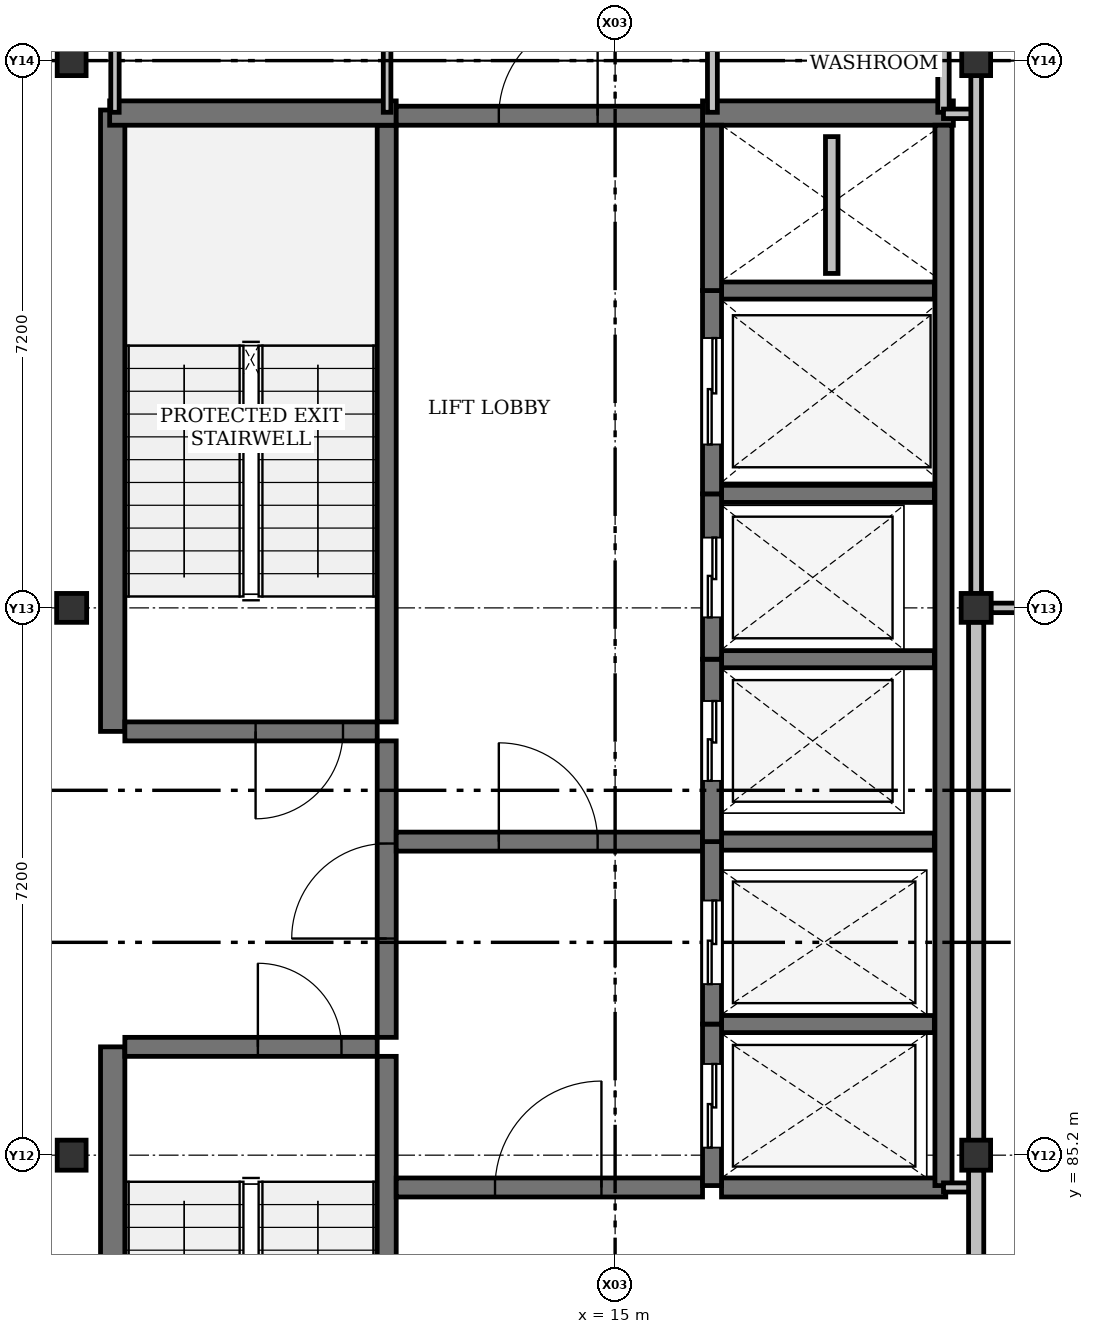
"""IFC4 building model, lengths in metres.
Left out: names, types, materials, properties, quantities, classifications, styles, units other than length and angle.
Written with IfcOpenShell. Run it as: python <this file> out.ifc"""

import sys

from ifc_helpers import new_model, si_unit, direction, frame, frame_2d, origin, origin_2d, place, context, subcontext, project, spatial, rectangle, i_section, extrude, element, fill, save


model = new_model("IFC4")
c1 = context("Model", 3, precision=1e-05, world=origin(), true_north=direction((0.0, 1.0)))
c2 = subcontext(c1, "Body", "Model", "MODEL_VIEW")
j1 = project(units=[si_unit("LENGTHUNIT", "METRE"), si_unit("PLANEANGLEUNIT", "RADIAN")], contexts=[c1])
p1 = place(None, origin())
s1 = spatial("IfcSite", under=j1, at=p1, CompositionType="ELEMENT")
p2 = place(p1, origin())
s2 = spatial("IfcBuilding", under=s1, at=p2, CompositionType="ELEMENT")
p3 = place(p2, frame((0.0, 0.0, 18.3)))
s3 = spatial("IfcBuildingStorey", under=s2, at=p3, CompositionType="ELEMENT", Elevation=18.3)
for number, where, z_axis, x_axis in (
    (1, (7.85, 85.2, 0.0), (0.0, 0.0, 1.0), (0.0, 1.0, 0.0)),
    (2, (19.75, 85.2, 0.0), (0.0, 0.0, 1.0), (0.0, 1.0, 0.0)),
    (3, (7.85, 92.4, 0.0), (0.0, 0.0, 1.0), (1.0, 0.0, 0.0)),
    (4, (19.75, 92.4, 0.0), (0.0, 0.0, 1.0), (1.0, 0.0, 0.0)),
    (5, (7.85, 99.6, 0.0), (0.0, 0.0, 1.0), (0.0, 1.0, 0.0)),
    (6, (19.75, 99.6, 0.0), (0.0, 0.0, 1.0), (0.0, 1.0, 0.0)),
):
    element("IfcColumn", number, at=place(p3, frame(where, z_axis=z_axis, x_axis=x_axis)), inside=s3, PredefinedType="COLUMN", context=c2, shape_type="SweptSolid", body=[
        extrude(i_section(OverallWidth=0.395, OverallDepth=0.38, WebThickness=0.019, FlangeThickness=0.03, FilletRadius=0.015, at=origin_2d()), origin(), (0.0, 0.0, 1.0), 4.2),
    ])
for number, where, z_axis, x_axis in (
    (7, (8.39, 78.45, 0.0), (0.0, 0.0, 1.0), (0.0, 1.0, 0.0)),
    (8, (8.39, 90.775, 0.0), (0.0, 0.0, 1.0), (0.0, 1.0, 0.0)),
):
    element("IfcWall", number, at=place(p3, frame(where, z_axis=z_axis, x_axis=x_axis)), inside=s3, PredefinedType="SHEAR", context=c2, shape_type="SweptSolid", body=[
        extrude(rectangle(XDim=8.175, YDim=0.32, at=frame_2d((4.087, 0.0))), origin(), (0.0, 0.0, 1.0), 4.2),
    ])
for number, where, z_axis, x_axis in (
    (9, (11.995, 78.65, 0.0), (0.0, 0.0, 1.0), (0.0, 1.0, 0.0)),
    (10, (11.995, 90.9, 0.0), (0.0, 0.0, 1.0), (0.0, 1.0, 0.0)),
):
    element("IfcWall", number, at=place(p3, frame(where, z_axis=z_axis, x_axis=x_axis)), inside=s3, PredefinedType="SHEAR", context=c2, shape_type="SweptSolid", body=[
        extrude(rectangle(XDim=7.85, YDim=0.25, at=frame_2d((3.925, 0.0))), origin(), (0.0, 0.0, 1.0), 4.2),
    ])
p4 = place(p3, frame((11.995, 86.75, 0.0), z_axis=(0.0, 0.0, 1.0), x_axis=(0.0, 1.0, 0.0)))
e11 = element("IfcWall", 11, at=p4, inside=s3, PredefinedType="SHEAR", context=c2, shape_type="SweptSolid", body=[
    extrude(rectangle(XDim=3.9, YDim=0.25, at=frame_2d((1.95, 0.0))), origin(), (0.0, 0.0, 1.0), 4.2),
])
p5 = place(p4, frame((1.3, 0.0, 0.0)))
e12 = element("IfcOpeningElement", 12, at=p5, cuts=e11, PredefinedType="OPENING", context=c2, shape_type="SweptSolid", body=[
    extrude(rectangle(XDim=1.25, YDim=2.2, at=frame_2d((0.625, 1.1))), frame((0.0, 0.125, 0.0), z_axis=(0.0, -1.0, 0.0), x_axis=(1.0, 0.0, 0.0)), (0.0, 0.0, 1.0), 0.25),
])
p6 = place(p3, frame((8.35, 98.91, 0.0), z_axis=(0.0, 0.0, 1.0), x_axis=(1.0, 0.0, 0.0)))
e13 = element("IfcWall", 13, at=p6, inside=s3, PredefinedType="SHEAR", context=c2, shape_type="SweptSolid", body=[
    extrude(rectangle(XDim=3.77, YDim=0.32, at=frame_2d((1.885, 0.0))), origin(), (0.0, 0.0, 1.0), 4.2),
])
p7 = place(p3, frame((16.15, 98.91, 0.0), z_axis=(0.0, 0.0, 1.0), x_axis=(1.0, 0.0, 0.0)))
e14 = element("IfcWall", 14, at=p7, inside=s3, PredefinedType="SHEAR", context=c2, shape_type="SweptSolid", body=[
    extrude(rectangle(XDim=3.3, YDim=0.32, at=frame_2d((1.65, 0.0))), origin(), (0.0, 0.0, 1.0), 4.2),
])
p8 = place(p3, frame((12.12, 98.875, 0.0), z_axis=(0.0, 0.0, 1.0), x_axis=(1.0, 0.0, 0.0)))
e15 = element("IfcWall", 15, at=p8, inside=s3, PredefinedType="SHEAR", context=c2, shape_type="SweptSolid", body=[
    extrude(rectangle(XDim=4.03, YDim=0.25, at=frame_2d((2.015, 0.0))), origin(), (0.0, 0.0, 1.0), 4.2),
])
p9 = place(p8, frame((1.35, 0.0, 0.0)))
e16 = element("IfcOpeningElement", 16, at=p9, cuts=e15, PredefinedType="OPENING", context=c2, shape_type="SweptSolid", body=[
    extrude(rectangle(XDim=1.3, YDim=2.2, at=frame_2d((0.65, 1.1))), frame((0.0, 0.125, 0.0), z_axis=(0.0, -1.0, 0.0), x_axis=(1.0, 0.0, 0.0)), (0.0, 0.0, 1.0), 0.25),
])
p10 = place(p3, frame((8.55, 86.625, 0.0), z_axis=(0.0, 0.0, 1.0), x_axis=(1.0, 0.0, 0.0)))
e17 = element("IfcWall", 17, at=p10, inside=s3, PredefinedType="SHEAR", context=c2, shape_type="SweptSolid", body=[
    extrude(rectangle(XDim=3.32, YDim=0.25, at=frame_2d((1.66, 0.0))), origin(), (0.0, 0.0, 1.0), 4.2),
])
p11 = place(p10, frame((1.75, 0.0, 0.0)))
e18 = element("IfcOpeningElement", 18, at=p11, cuts=e17, PredefinedType="OPENING", context=c2, shape_type="SweptSolid", body=[
    extrude(rectangle(XDim=1.1, YDim=2.15, at=frame_2d((0.55, 1.075))), frame((0.0, 0.125, 0.0), z_axis=(0.0, -1.0, 0.0), x_axis=(1.0, 0.0, 0.0)), (0.0, 0.0, 1.0), 0.25),
])
p12 = place(p3, frame((11.87, 90.775, 0.0), z_axis=(0.0, 0.0, 1.0), x_axis=(-1.0, 0.0, 0.0)))
e19 = element("IfcWall", 19, at=p12, inside=s3, PredefinedType="SHEAR", context=c2, shape_type="SweptSolid", body=[
    extrude(rectangle(XDim=3.32, YDim=0.25, at=frame_2d((1.66, 0.0))), origin(), (0.0, 0.0, 1.0), 4.2),
])
p13 = place(p12, frame((0.45, 0.0, 0.0)))
e20 = element("IfcOpeningElement", 20, at=p13, cuts=e19, PredefinedType="OPENING", context=c2, shape_type="SweptSolid", body=[
    extrude(rectangle(XDim=1.15, YDim=2.15, at=frame_2d((0.575, 1.075))), frame((0.0, 0.125, 0.0), z_axis=(0.0, -1.0, 0.0), x_axis=(1.0, 0.0, 0.0)), (0.0, 0.0, 1.0), 0.25),
])
p14 = place(p3, frame((12.12, 89.325, 0.0), z_axis=(0.0, 0.0, 1.0), x_axis=(1.0, 0.0, 0.0)))
e21 = element("IfcWall", 21, at=p14, inside=s3, PredefinedType="SHEAR", context=c2, shape_type="SweptSolid", body=[
    extrude(rectangle(XDim=4.03, YDim=0.25, at=frame_2d((2.015, 0.0))), origin(), (0.0, 0.0, 1.0), 4.2),
])
p15 = place(p14, frame((1.35, 0.0, 0.0)))
e22 = element("IfcOpeningElement", 22, at=p15, cuts=e21, PredefinedType="OPENING", context=c2, shape_type="SweptSolid", body=[
    extrude(rectangle(XDim=1.3, YDim=2.2, at=frame_2d((0.65, 1.1))), frame((0.0, 0.125, 0.0), z_axis=(0.0, -1.0, 0.0), x_axis=(1.0, 0.0, 0.0)), (0.0, 0.0, 1.0), 0.25),
])
p16 = place(p3, frame((12.12, 84.775, 0.0), z_axis=(0.0, 0.0, 1.0), x_axis=(1.0, 0.0, 0.0)))
e23 = element("IfcWall", 23, at=p16, inside=s3, PredefinedType="SHEAR", context=c2, shape_type="SweptSolid", body=[
    extrude(rectangle(XDim=4.03, YDim=0.25, at=frame_2d((2.015, 0.0))), origin(), (0.0, 0.0, 1.0), 4.2),
])
p17 = place(p16, frame((1.3, 0.0, 0.0)))
e24 = element("IfcOpeningElement", 24, at=p17, cuts=e23, PredefinedType="OPENING", context=c2, shape_type="SweptSolid", body=[
    extrude(rectangle(XDim=1.4, YDim=2.25, at=frame_2d((0.7, 1.125))), frame((0.0, 0.125, 0.0), z_axis=(0.0, -1.0, 0.0), x_axis=(1.0, 0.0, 0.0)), (0.0, 0.0, 1.0), 0.25),
])
p18 = place(p3, frame((16.4, 84.775, 0.0), z_axis=(0.0, 0.0, 1.0), x_axis=(1.0, 0.0, 0.0)))
e25 = element("IfcWall", 25, at=p18, inside=s3, PredefinedType="SHEAR", context=c2, shape_type="SweptSolid", body=[
    extrude(rectangle(XDim=2.95, YDim=0.25, at=frame_2d((1.475, 0.0))), origin(), (0.0, 0.0, 1.0), 4.2),
])
p19 = place(p3, frame((19.32, 84.8, 0.0), z_axis=(0.0, 0.0, 1.0), x_axis=(0.0, 1.0, 0.0)))
e26 = element("IfcWall", 26, at=p19, inside=s3, PredefinedType="SHEAR", context=c2, shape_type="SweptSolid", body=[
    extrude(rectangle(XDim=13.95, YDim=0.225, at=frame_2d((6.975, 0.0))), origin(), (0.0, 0.0, 1.0), 4.2),
])
for number, where, z_axis, x_axis in (
    (27, (16.4, 86.925, 0.0), (0.0, 0.0, 1.0), (1.0, 0.0, 0.0)),
    (28, (16.4, 89.325, 0.0), (0.0, 0.0, 1.0), (1.0, 0.0, 0.0)),
    (29, (16.4, 91.725, 0.0), (0.0, 0.0, 1.0), (1.0, 0.0, 0.0)),
    (30, (16.4, 93.9, 0.0), (0.0, 0.0, 1.0), (1.0, 0.0, 0.0)),
    (31, (16.4, 96.575, 0.0), (0.0, 0.0, 1.0), (1.0, 0.0, 0.0)),
):
    element("IfcWall", number, at=place(p3, frame(where, z_axis=z_axis, x_axis=x_axis)), inside=s3, PredefinedType="SHEAR", context=c2, shape_type="SweptSolid", body=[
        extrude(rectangle(XDim=2.8, YDim=0.225, at=frame_2d((1.4, 0.0))), origin(), (0.0, 0.0, 1.0), 4.2),
    ])
p20 = place(p3, frame((16.275, 84.8, 0.0), z_axis=(0.0, 0.0, 1.0), x_axis=(0.0, 1.0, 0.0)))
e32 = element("IfcWall", 32, at=p20, inside=s3, PredefinedType="SHEAR", context=c2, shape_type="SweptSolid", body=[
    extrude(rectangle(XDim=2.125, YDim=0.25, at=frame_2d((1.062, 0.0))), origin(), (0.0, 0.0, 1.0), 4.2),
])
p21 = place(p20, frame((0.5, 0.0, 0.0)))
e33 = element("IfcOpeningElement", 33, at=p21, cuts=e32, PredefinedType="OPENING", context=c2, shape_type="SweptSolid", body=[
    extrude(rectangle(XDim=1.1, YDim=2.15, at=frame_2d((0.55, 1.075))), frame((0.0, 0.125, 0.0), z_axis=(0.0, -1.0, 0.0), x_axis=(1.0, 0.0, 0.0)), (0.0, 0.0, 1.0), 0.25),
])
p22 = place(p3, frame((16.275, 86.925, 0.0), z_axis=(0.0, 0.0, 1.0), x_axis=(0.0, 1.0, 0.0)))
e34 = element("IfcWall", 34, at=p22, inside=s3, PredefinedType="SHEAR", context=c2, shape_type="SweptSolid", body=[
    extrude(rectangle(XDim=2.4, YDim=0.25, at=frame_2d((1.2, 0.0))), origin(), (0.0, 0.0, 1.0), 4.2),
])
p23 = place(p22, frame((0.525, 0.0, 0.0)))
e35 = element("IfcOpeningElement", 35, at=p23, cuts=e34, PredefinedType="OPENING", context=c2, shape_type="SweptSolid", body=[
    extrude(rectangle(XDim=1.1, YDim=2.15, at=frame_2d((0.55, 1.075))), frame((0.0, 0.125, 0.0), z_axis=(0.0, -1.0, 0.0), x_axis=(1.0, 0.0, 0.0)), (0.0, 0.0, 1.0), 0.25),
])
p24 = place(p3, frame((16.275, 89.325, 0.0), z_axis=(0.0, 0.0, 1.0), x_axis=(0.0, 1.0, 0.0)))
e36 = element("IfcWall", 36, at=p24, inside=s3, PredefinedType="SHEAR", context=c2, shape_type="SweptSolid", body=[
    extrude(rectangle(XDim=2.4, YDim=0.25, at=frame_2d((1.2, 0.0))), origin(), (0.0, 0.0, 1.0), 4.2),
])
p25 = place(p24, frame((0.8, 0.0, 0.0)))
e37 = element("IfcOpeningElement", 37, at=p25, cuts=e36, PredefinedType="OPENING", context=c2, shape_type="SweptSolid", body=[
    extrude(rectangle(XDim=1.05, YDim=2.15, at=frame_2d((0.525, 1.075))), frame((0.0, 0.125, 0.0), z_axis=(0.0, -1.0, 0.0), x_axis=(1.0, 0.0, 0.0)), (0.0, 0.0, 1.0), 0.25),
])
p26 = place(p3, frame((16.275, 91.725, 0.0), z_axis=(0.0, 0.0, 1.0), x_axis=(0.0, 1.0, 0.0)))
e38 = element("IfcWall", 38, at=p26, inside=s3, PredefinedType="SHEAR", context=c2, shape_type="SweptSolid", body=[
    extrude(rectangle(XDim=2.175, YDim=0.25, at=frame_2d((1.087, 0.0))), origin(), (0.0, 0.0, 1.0), 4.2),
])
p27 = place(p26, frame((0.55, 0.0, 0.0)))
e39 = element("IfcOpeningElement", 39, at=p27, cuts=e38, PredefinedType="OPENING", context=c2, shape_type="SweptSolid", body=[
    extrude(rectangle(XDim=1.05, YDim=2.15, at=frame_2d((0.525, 1.075))), frame((0.0, 0.125, 0.0), z_axis=(0.0, -1.0, 0.0), x_axis=(1.0, 0.0, 0.0)), (0.0, 0.0, 1.0), 0.25),
])
p28 = place(p3, frame((16.275, 93.9, 0.0), z_axis=(0.0, 0.0, 1.0), x_axis=(0.0, 1.0, 0.0)))
e40 = element("IfcWall", 40, at=p28, inside=s3, PredefinedType="SHEAR", context=c2, shape_type="SweptSolid", body=[
    extrude(rectangle(XDim=2.675, YDim=0.25, at=frame_2d((1.337, 0.0))), origin(), (0.0, 0.0, 1.0), 4.2),
])
p29 = place(p28, frame((0.65, 0.0, 0.0)))
e41 = element("IfcOpeningElement", 41, at=p29, cuts=e40, PredefinedType="OPENING", context=c2, shape_type="SweptSolid", body=[
    extrude(rectangle(XDim=1.4, YDim=2.25, at=frame_2d((0.7, 1.125))), frame((0.0, 0.125, 0.0), z_axis=(0.0, -1.0, 0.0), x_axis=(1.0, 0.0, 0.0)), (0.0, 0.0, 1.0), 0.25),
])
p30 = place(p3, frame((16.275, 96.575, 0.0), z_axis=(0.0, 0.0, 1.0), x_axis=(0.0, 1.0, 0.0)))
e42 = element("IfcWall", 42, at=p30, inside=s3, PredefinedType="SHEAR", context=c2, shape_type="SweptSolid", body=[
    extrude(rectangle(XDim=2.175, YDim=0.25, at=frame_2d((1.087, 0.0))), origin(), (0.0, 0.0, 1.0), 4.2),
])
p31 = place(p3, frame((17.85, 96.8, 0.0), z_axis=(0.0, 0.0, 1.0), x_axis=(0.0, 1.0, 0.0)))
e43 = element("IfcWall", 43, at=p31, inside=s3, PredefinedType="PLUMBINGWALL", context=c2, shape_type="SweptSolid", body=[
    extrude(rectangle(XDim=1.8, YDim=0.165, at=frame_2d((0.9, 0.0))), origin(), (0.0, 0.0, 1.0), 4.2),
])
p32 = place(p3, frame((8.42, 98.92, 0.0), z_axis=(0.0, 0.0, 1.0), x_axis=(0.0, 1.0, 0.0)))
e44 = element("IfcWall", 44, at=p32, inside=s3, PredefinedType="PARTITIONING", context=c2, shape_type="SweptSolid", body=[
    extrude(rectangle(XDim=2.74, YDim=0.11, at=frame_2d((1.37, 0.0))), origin(), (0.0, 0.0, 1.0), 3.451),
])
p33 = place(p3, frame((12.0, 101.6, 0.0), z_axis=(0.0, 0.0, 1.0), x_axis=(0.0, -1.0, 0.0)))
e45 = element("IfcWall", 45, at=p33, inside=s3, PredefinedType="PARTITIONING", context=c2, shape_type="SweptSolid", body=[
    extrude(rectangle(XDim=2.68, YDim=0.1, at=frame_2d((1.34, 0.0))), origin(), (0.0, 0.0, 1.0), 3.451),
])
p34 = place(p33, frame((0.84, 0.0, 0.0)))
e46 = element("IfcOpeningElement", 46, at=p34, cuts=e45, PredefinedType="OPENING", context=c2, shape_type="SweptSolid", body=[
    extrude(rectangle(XDim=1.0, YDim=2.25, at=frame_2d((0.5, 1.125))), frame((0.0, 0.05, 0.0), z_axis=(0.0, -1.0, 0.0), x_axis=(1.0, 0.0, 0.0)), (0.0, 0.0, 1.0), 0.1),
])
p35 = place(p3, frame((19.32, 98.92, 0.0), z_axis=(0.0, 0.0, 1.0), x_axis=(0.0, 1.0, 0.0)))
e47 = element("IfcWall", 47, at=p35, inside=s3, PredefinedType="PARTITIONING", context=c2, shape_type="SweptSolid", body=[
    extrude(rectangle(XDim=2.74, YDim=0.15, at=frame_2d((1.37, 0.0))), origin(), (0.0, 0.0, 1.0), 3.451),
])
p36 = place(p3, frame((16.28, 98.92, 0.0), z_axis=(0.0, 0.0, 1.0), x_axis=(0.0, 1.0, 0.0)))
e48 = element("IfcWall", 48, at=p36, inside=s3, PredefinedType="PARTITIONING", context=c2, shape_type="SweptSolid", body=[
    extrude(rectangle(XDim=2.68, YDim=0.13, at=frame_2d((1.34, 0.0))), origin(), (0.0, 0.0, 1.0), 3.451),
])
p37 = place(p36, frame((0.89, 0.0, 0.0)))
e49 = element("IfcOpeningElement", 49, at=p37, cuts=e48, PredefinedType="OPENING", context=c2, shape_type="SweptSolid", body=[
    extrude(rectangle(XDim=0.9, YDim=2.08, at=frame_2d((0.45, 1.04))), frame((0.0, 0.065, 0.0), z_axis=(0.0, -1.0, 0.0), x_axis=(1.0, 0.0, 0.0)), (0.0, 0.0, 1.0), 0.13),
])
p38 = place(p3, frame((19.75, 98.9, 0.0), z_axis=(0.0, 0.0, 1.0), x_axis=(-1.0, 0.0, 0.0)))
e50 = element("IfcWall", 50, at=p38, inside=s3, PredefinedType="PARTITIONING", context=c2, shape_type="SweptSolid", body=[
    extrude(rectangle(XDim=0.43, YDim=0.125, at=frame_2d((0.215, 0.0))), origin(), (0.0, 0.0, 1.0), 3.527),
])
p39 = place(p3, frame((19.32, 84.775, 0.0), z_axis=(0.0, 0.0, 1.0), x_axis=(1.0, 0.0, 0.0)))
e51 = element("IfcWall", 51, at=p39, inside=s3, PredefinedType="PARTITIONING", context=c2, shape_type="SweptSolid", body=[
    extrude(rectangle(XDim=0.43, YDim=0.12, at=frame_2d((0.215, 0.0))), origin(), (0.0, 0.0, 1.0), 3.527),
])
p40 = place(p3, frame((19.75, 78.185, 0.0), z_axis=(0.0, 0.0, 1.0), x_axis=(0.0, 1.0, 0.0)))
e52 = element("IfcWall", 52, at=p40, inside=s3, PredefinedType="SOLIDWALL", context=c2, shape_type="SweptSolid", body=[
    extrude(rectangle(XDim=6.823, YDim=0.2, at=frame_2d((3.411, 0.0))), origin(), (0.0, 0.0, 1.0), 3.527),
])
p41 = place(p40, frame((2.74, 0.0, 0.0)))
e53 = element("IfcOpeningElement", 53, at=p41, cuts=e52, PredefinedType="OPENING", context=c2, shape_type="SweptSolid", body=[
    extrude(rectangle(XDim=1.35, YDim=2.25, at=frame_2d((0.675, 1.125))), frame((0.0, 0.1, 0.0), z_axis=(0.0, -1.0, 0.0), x_axis=(1.0, 0.0, 0.0)), (0.0, 0.0, 1.0), 0.2),
])
p42 = place(p3, frame((19.75, 85.393, 0.0), z_axis=(0.0, 0.0, 1.0), x_axis=(0.0, 1.0, 0.0)))
e54 = element("IfcWall", 54, at=p42, inside=s3, PredefinedType="SOLIDWALL", context=c2, shape_type="SweptSolid", body=[
    extrude(rectangle(XDim=6.823, YDim=0.2, at=frame_2d((3.411, 0.0))), origin(), (0.0, 0.0, 1.0), 3.527),
])
p43 = place(p3, frame((19.75, 92.585, 0.0), z_axis=(0.0, 0.0, 1.0), x_axis=(0.0, 1.0, 0.0)))
e55 = element("IfcWall", 55, at=p43, inside=s3, PredefinedType="PARTITIONING", context=c2, shape_type="SweptSolid", body=[
    extrude(rectangle(XDim=6.823, YDim=0.14, at=frame_2d((3.411, 0.0))), origin(), (0.0, 0.0, 1.0), 3.527),
])
p44 = place(p3, frame((29.357, 92.4, 0.0), z_axis=(0.0, 0.0, 1.0), x_axis=(-1.0, 0.0, 0.0)))
e56 = element("IfcWall", 56, at=p44, inside=s3, PredefinedType="PARTITIONING", context=c2, shape_type="SweptSolid", body=[
    extrude(rectangle(XDim=9.415, YDim=0.125, at=frame_2d((4.708, 0.0))), origin(), (0.0, 0.0, 1.0), 2.79),
])
p45 = place(p5, origin())
e57 = element("IfcDoor", 57, at=p45, inside=s3, OperationType="SINGLE_SWING_LEFT", PredefinedType="DOOR", context=c2, shape_type="SweptSolid", body=[
    extrude(rectangle(XDim=1.25, YDim=2.2, at=frame_2d((0.625, 1.1))), frame((0.0, 0.025, 0.0), z_axis=(0.0, -1.0, 0.0), x_axis=(1.0, 0.0, 0.0)), (0.0, 0.0, 1.0), 0.05),
])
fill(e12, e57)
p46 = place(p9, origin())
e58 = element("IfcDoor", 58, at=p46, inside=s3, OperationType="SINGLE_SWING_RIGHT", PredefinedType="DOOR", context=c2, shape_type="SweptSolid", body=[
    extrude(rectangle(XDim=1.3, YDim=2.2, at=frame_2d((0.65, 1.1))), frame((0.0, 0.025, 0.0), z_axis=(0.0, -1.0, 0.0), x_axis=(1.0, 0.0, 0.0)), (0.0, 0.0, 1.0), 0.05),
])
fill(e16, e58)
p47 = place(p11, origin())
e59 = element("IfcDoor", 59, at=p47, inside=s3, OperationType="SINGLE_SWING_LEFT", PredefinedType="DOOR", context=c2, shape_type="SweptSolid", body=[
    extrude(rectangle(XDim=1.1, YDim=2.15, at=frame_2d((0.55, 1.075))), frame((0.0, 0.025, 0.0), z_axis=(0.0, -1.0, 0.0), x_axis=(1.0, 0.0, 0.0)), (0.0, 0.0, 1.0), 0.05),
])
fill(e18, e59)
p48 = place(p13, origin())
e60 = element("IfcDoor", 60, at=p48, inside=s3, OperationType="SINGLE_SWING_RIGHT", PredefinedType="DOOR", context=c2, shape_type="SweptSolid", body=[
    extrude(rectangle(XDim=1.15, YDim=2.15, at=frame_2d((0.575, 1.075))), frame((0.0, 0.025, 0.0), z_axis=(0.0, -1.0, 0.0), x_axis=(1.0, 0.0, 0.0)), (0.0, 0.0, 1.0), 0.05),
])
fill(e20, e60)
p49 = place(p15, origin())
e61 = element("IfcDoor", 61, at=p49, inside=s3, OperationType="SINGLE_SWING_LEFT", PredefinedType="DOOR", context=c2, shape_type="SweptSolid", body=[
    extrude(rectangle(XDim=1.3, YDim=2.2, at=frame_2d((0.65, 1.1))), frame((0.0, 0.025, 0.0), z_axis=(0.0, -1.0, 0.0), x_axis=(1.0, 0.0, 0.0)), (0.0, 0.0, 1.0), 0.05),
])
fill(e22, e61)
p50 = place(p17, origin())
e62 = element("IfcDoor", 62, at=p50, inside=s3, OperationType="SINGLE_SWING_RIGHT", PredefinedType="DOOR", context=c2, shape_type="SweptSolid", body=[
    extrude(rectangle(XDim=1.4, YDim=2.25, at=frame_2d((0.7, 1.125))), frame((0.0, 0.025, 0.0), z_axis=(0.0, -1.0, 0.0), x_axis=(1.0, 0.0, 0.0)), (0.0, 0.0, 1.0), 0.05),
])
fill(e24, e62)
p51 = place(p21, origin())
e63 = element("IfcDoor", 63, at=p51, inside=s3, OperationType="SLIDING_TO_LEFT", PredefinedType="DOOR", context=c2, shape_type="SweptSolid", body=[
    extrude(rectangle(XDim=1.1, YDim=2.15, at=frame_2d((0.55, 1.075))), frame((0.0, 0.025, 0.0), z_axis=(0.0, -1.0, 0.0), x_axis=(1.0, 0.0, 0.0)), (0.0, 0.0, 1.0), 0.05),
])
fill(e33, e63)
p52 = place(p23, origin())
e64 = element("IfcDoor", 64, at=p52, inside=s3, OperationType="SLIDING_TO_LEFT", PredefinedType="DOOR", context=c2, shape_type="SweptSolid", body=[
    extrude(rectangle(XDim=1.1, YDim=2.15, at=frame_2d((0.55, 1.075))), frame((0.0, 0.025, 0.0), z_axis=(0.0, -1.0, 0.0), x_axis=(1.0, 0.0, 0.0)), (0.0, 0.0, 1.0), 0.05),
])
fill(e35, e64)
p53 = place(p25, origin())
e65 = element("IfcDoor", 65, at=p53, inside=s3, OperationType="SLIDING_TO_LEFT", PredefinedType="DOOR", context=c2, shape_type="SweptSolid", body=[
    extrude(rectangle(XDim=1.05, YDim=2.15, at=frame_2d((0.525, 1.075))), frame((0.0, 0.025, 0.0), z_axis=(0.0, -1.0, 0.0), x_axis=(1.0, 0.0, 0.0)), (0.0, 0.0, 1.0), 0.05),
])
fill(e37, e65)
p54 = place(p27, origin())
e66 = element("IfcDoor", 66, at=p54, inside=s3, OperationType="SLIDING_TO_LEFT", PredefinedType="DOOR", context=c2, shape_type="SweptSolid", body=[
    extrude(rectangle(XDim=1.05, YDim=2.15, at=frame_2d((0.525, 1.075))), frame((0.0, 0.025, 0.0), z_axis=(0.0, -1.0, 0.0), x_axis=(1.0, 0.0, 0.0)), (0.0, 0.0, 1.0), 0.05),
])
fill(e39, e66)
p55 = place(p29, origin())
e67 = element("IfcDoor", 67, at=p55, inside=s3, OperationType="SLIDING_TO_LEFT", PredefinedType="DOOR", context=c2, shape_type="SweptSolid", body=[
    extrude(rectangle(XDim=1.4, YDim=2.25, at=frame_2d((0.7, 1.125))), frame((0.0, 0.025, 0.0), z_axis=(0.0, -1.0, 0.0), x_axis=(1.0, 0.0, 0.0)), (0.0, 0.0, 1.0), 0.05),
])
fill(e41, e67)
save(model, sys.argv[1])
